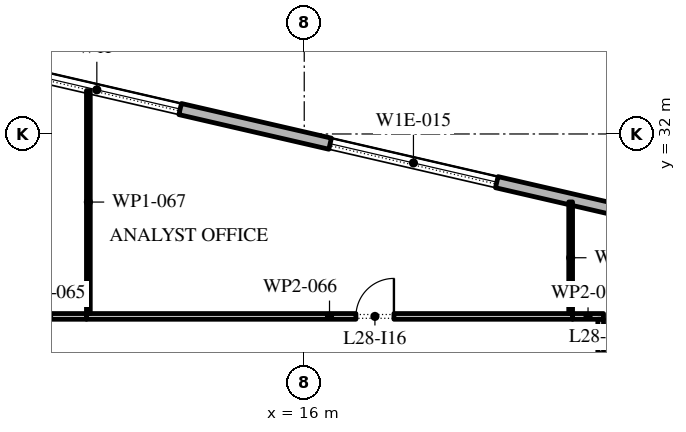
"""IFC4 building model, lengths in metres.
Left out: names, types, materials, properties, quantities, classifications, styles, units other than length and angle.
Written with IfcOpenShell. Run it as: python <this file> out.ifc"""

import sys

from ifc_helpers import new_model, si_unit, direction, frame, frame_2d, origin, place, context, subcontext, project, spatial, rectangle, extrude, element, fill, save


model = new_model("IFC4")
c1 = context("Model", 3, precision=1e-05, world=origin(), true_north=direction((0.0, 1.0)))
c2 = subcontext(c1, "Body", "Model", "MODEL_VIEW")
j1 = project(units=[si_unit("LENGTHUNIT", "METRE"), si_unit("PLANEANGLEUNIT", "RADIAN")], contexts=[c1])
p1 = place(None, origin())
s1 = spatial("IfcSite", under=j1, at=p1, CompositionType="ELEMENT")
p2 = place(p1, origin())
s2 = spatial("IfcBuilding", under=s1, at=p2, CompositionType="ELEMENT")
p3 = place(p2, frame((0.0, 0.0, 130.8)))
s3 = spatial("IfcBuildingStorey", under=s2, at=p3, CompositionType="ELEMENT", Elevation=130.8)
p4 = place(p3, frame((31.078, 28.421, 0.0), z_axis=(0.0, 0.0, 1.0), x_axis=(-0.974370456532, 0.224949357493, 0.0)))
e1 = element("IfcWall", 1, at=p4, inside=s3, PredefinedType="STANDARD", context=c2, shape_type="SweptSolid", body=[
    extrude(rectangle(XDim=51.0, YDim=0.3, at=frame_2d((25.5, 0.0))), origin(), (0.0, 0.0, 1.0), 4.0),
])
p5 = place(p4, frame((1.875, 0.0, 0.45)))
e2 = element("IfcOpeningElement", 2, at=p5, cuts=e1, PredefinedType="OPENING", context=c2, shape_type="SweptSolid", body=[
    extrude(rectangle(XDim=4.5, YDim=2.95, at=frame_2d((2.25, 1.475))), frame((0.0, 0.16, 0.0), z_axis=(0.0, -1.0, 0.0), x_axis=(1.0, 0.0, 0.0)), (0.0, 0.0, 1.0), 0.32),
])
p6 = place(p4, frame((10.275, 0.0, 0.45)))
e3 = element("IfcOpeningElement", 3, at=p6, cuts=e1, PredefinedType="OPENING", context=c2, shape_type="SweptSolid", body=[
    extrude(rectangle(XDim=4.5, YDim=2.825, at=frame_2d((2.25, 1.413))), frame((0.0, 0.16, 0.0), z_axis=(0.0, -1.0, 0.0), x_axis=(1.0, 0.0, 0.0)), (0.0, 0.0, 1.0), 0.32),
])
p7 = place(p4, frame((18.825, 0.0, 0.45)))
e4 = element("IfcOpeningElement", 4, at=p7, cuts=e1, PredefinedType="OPENING", context=c2, shape_type="SweptSolid", body=[
    extrude(rectangle(XDim=4.5, YDim=2.8, at=frame_2d((2.25, 1.4))), frame((0.0, 0.16, 0.0), z_axis=(0.0, -1.0, 0.0), x_axis=(1.0, 0.0, 0.0)), (0.0, 0.0, 1.0), 0.32),
])
p8 = place(p4, frame((27.075, 0.0, 0.0)))
e5 = element("IfcOpeningElement", 5, at=p8, cuts=e1, PredefinedType="OPENING", context=c2, shape_type="SweptSolid", body=[
    extrude(rectangle(XDim=2.4, YDim=3.125, at=frame_2d((1.2, 1.562))), frame((0.0, 0.16, 0.0), z_axis=(0.0, -1.0, 0.0), x_axis=(1.0, 0.0, 0.0)), (0.0, 0.0, 1.0), 0.32),
])
p9 = place(p4, frame((35.925, 0.0, 0.45)))
e6 = element("IfcOpeningElement", 6, at=p9, cuts=e1, PredefinedType="OPENING", context=c2, shape_type="SweptSolid", body=[
    extrude(rectangle(XDim=4.5, YDim=2.575, at=frame_2d((2.25, 1.288))), frame((0.0, 0.16, 0.0), z_axis=(0.0, -1.0, 0.0), x_axis=(1.0, 0.0, 0.0)), (0.0, 0.0, 1.0), 0.32),
])
p10 = place(p4, frame((44.475, 0.0, 0.45)))
e7 = element("IfcOpeningElement", 7, at=p10, cuts=e1, PredefinedType="OPENING", context=c2, shape_type="SweptSolid", body=[
    extrude(rectangle(XDim=4.5, YDim=2.45, at=frame_2d((2.25, 1.225))), frame((0.0, 0.16, 0.0), z_axis=(0.0, -1.0, 0.0), x_axis=(1.0, 0.0, 0.0)), (0.0, 0.0, 1.0), 0.32),
])
p11 = place(p3, frame((8.275, 27.2, 0.0), z_axis=(0.0, 0.0, 1.0), x_axis=(1.0, 0.0, 0.0)))
e8 = element("IfcWall", 8, at=p11, inside=s3, PredefinedType="PARTITIONING", context=c2, shape_type="SweptSolid", body=[
    extrude(rectangle(XDim=1.995, YDim=0.15, at=frame_2d((0.998, 0.0))), origin(), (0.0, 0.0, 1.0), 4.0),
])
p12 = place(p3, frame((10.27, 27.2, 0.0), z_axis=(0.0, 0.0, 1.0), x_axis=(1.0, 0.0, 0.0)))
e9 = element("IfcWall", 9, at=p12, inside=s3, PredefinedType="PARTITIONING", context=c2, shape_type="SweptSolid", body=[
    extrude(rectangle(XDim=12.79, YDim=0.15, at=frame_2d((6.395, 0.0))), origin(), (0.0, 0.0, 1.0), 4.0),
])
p13 = place(p12, frame((7.09, 0.0, 0.0)))
e10 = element("IfcOpeningElement", 10, at=p13, cuts=e9, PredefinedType="OPENING", context=c2, shape_type="SweptSolid", body=[
    extrude(rectangle(XDim=1.0, YDim=2.1, at=frame_2d((0.5, 1.05))), frame((0.0, 0.085, 0.0), z_axis=(0.0, -1.0, 0.0), x_axis=(1.0, 0.0, 0.0)), (0.0, 0.0, 1.0), 0.17),
])
p14 = place(p3, frame((10.32, 33.142, 0.0), z_axis=(0.0, 0.0, 1.0), x_axis=(0.0, -1.0, 0.0)))
e11 = element("IfcWall", 11, at=p14, inside=s3, PredefinedType="PARTITIONING", context=c2, shape_type="SweptSolid", body=[
    extrude(rectangle(XDim=5.867, YDim=0.1, at=frame_2d((2.934, 0.0))), origin(), (0.0, 0.0, 1.0), 4.0),
])
p15 = place(p3, frame((23.06, 27.2, 0.0), z_axis=(0.0, 0.0, 1.0), x_axis=(1.0, 0.0, 0.0)))
e12 = element("IfcWall", 12, at=p15, inside=s3, PredefinedType="PARTITIONING", context=c2, shape_type="SweptSolid", body=[
    extrude(rectangle(XDim=0.815, YDim=0.15, at=frame_2d((0.407, 0.0))), origin(), (0.0, 0.0, 1.0), 4.0),
])
p16 = place(p3, frame((23.01, 30.212, 0.0), z_axis=(0.0, 0.0, 1.0), x_axis=(0.0, -1.0, 0.0)))
e13 = element("IfcWall", 13, at=p16, inside=s3, PredefinedType="PARTITIONING", context=c2, shape_type="SweptSolid", body=[
    extrude(rectangle(XDim=2.937, YDim=0.1, at=frame_2d((1.469, 0.0))), origin(), (0.0, 0.0, 1.0), 4.0),
])
p17 = place(p3, frame((23.8, 27.125, 0.0), z_axis=(0.0, 0.0, 1.0), x_axis=(0.0, -1.0, 0.0)))
e14 = element("IfcWall", 14, at=p17, inside=s3, PredefinedType="PARTITIONING", context=c2, shape_type="SweptSolid", body=[
    extrude(rectangle(XDim=3.665, YDim=0.15, at=frame_2d((1.833, 0.0))), origin(), (0.0, 0.0, 1.0), 4.0),
])
p18 = place(p17, frame((1.065, 0.0, 0.0)))
e15 = element("IfcOpeningElement", 15, at=p18, cuts=e14, PredefinedType="OPENING", context=c2, shape_type="SweptSolid", body=[
    extrude(rectangle(XDim=1.0, YDim=2.1, at=frame_2d((0.5, 1.05))), frame((0.0, 0.085, 0.0), z_axis=(0.0, -1.0, 0.0), x_axis=(1.0, 0.0, 0.0)), (0.0, 0.0, 1.0), 0.17),
])
p19 = place(p6, origin())
e16 = element("IfcWindow", 16, at=p19, inside=s3, PartitioningType="DOUBLE_PANEL_VERTICAL", PredefinedType="WINDOW", context=c2, shape_type="SweptSolid", body=[
    extrude(rectangle(XDim=4.5, YDim=2.825, at=frame_2d((2.25, 1.413))), frame((0.0, 0.03, 0.0), z_axis=(0.0, -1.0, 0.0), x_axis=(1.0, 0.0, 0.0)), (0.0, 0.0, 1.0), 0.06),
])
fill(e3, e16)
p20 = place(p7, origin())
e17 = element("IfcWindow", 17, at=p20, inside=s3, PartitioningType="DOUBLE_PANEL_VERTICAL", PredefinedType="WINDOW", context=c2, shape_type="SweptSolid", body=[
    extrude(rectangle(XDim=4.5, YDim=2.8, at=frame_2d((2.25, 1.4))), frame((0.0, 0.03, 0.0), z_axis=(0.0, -1.0, 0.0), x_axis=(1.0, 0.0, 0.0)), (0.0, 0.0, 1.0), 0.06),
])
fill(e4, e17)
p21 = place(p13, origin())
e18 = element("IfcDoor", 18, at=p21, inside=s3, OperationType="SINGLE_SWING_LEFT", PredefinedType="DOOR", context=c2, shape_type="SweptSolid", body=[
    extrude(rectangle(XDim=1.0, YDim=2.1, at=frame_2d((0.5, 1.05))), frame((0.0, 0.025, 0.0), z_axis=(0.0, -1.0, 0.0), x_axis=(1.0, 0.0, 0.0)), (0.0, 0.0, 1.0), 0.05),
])
fill(e10, e18)
save(model, sys.argv[1])
